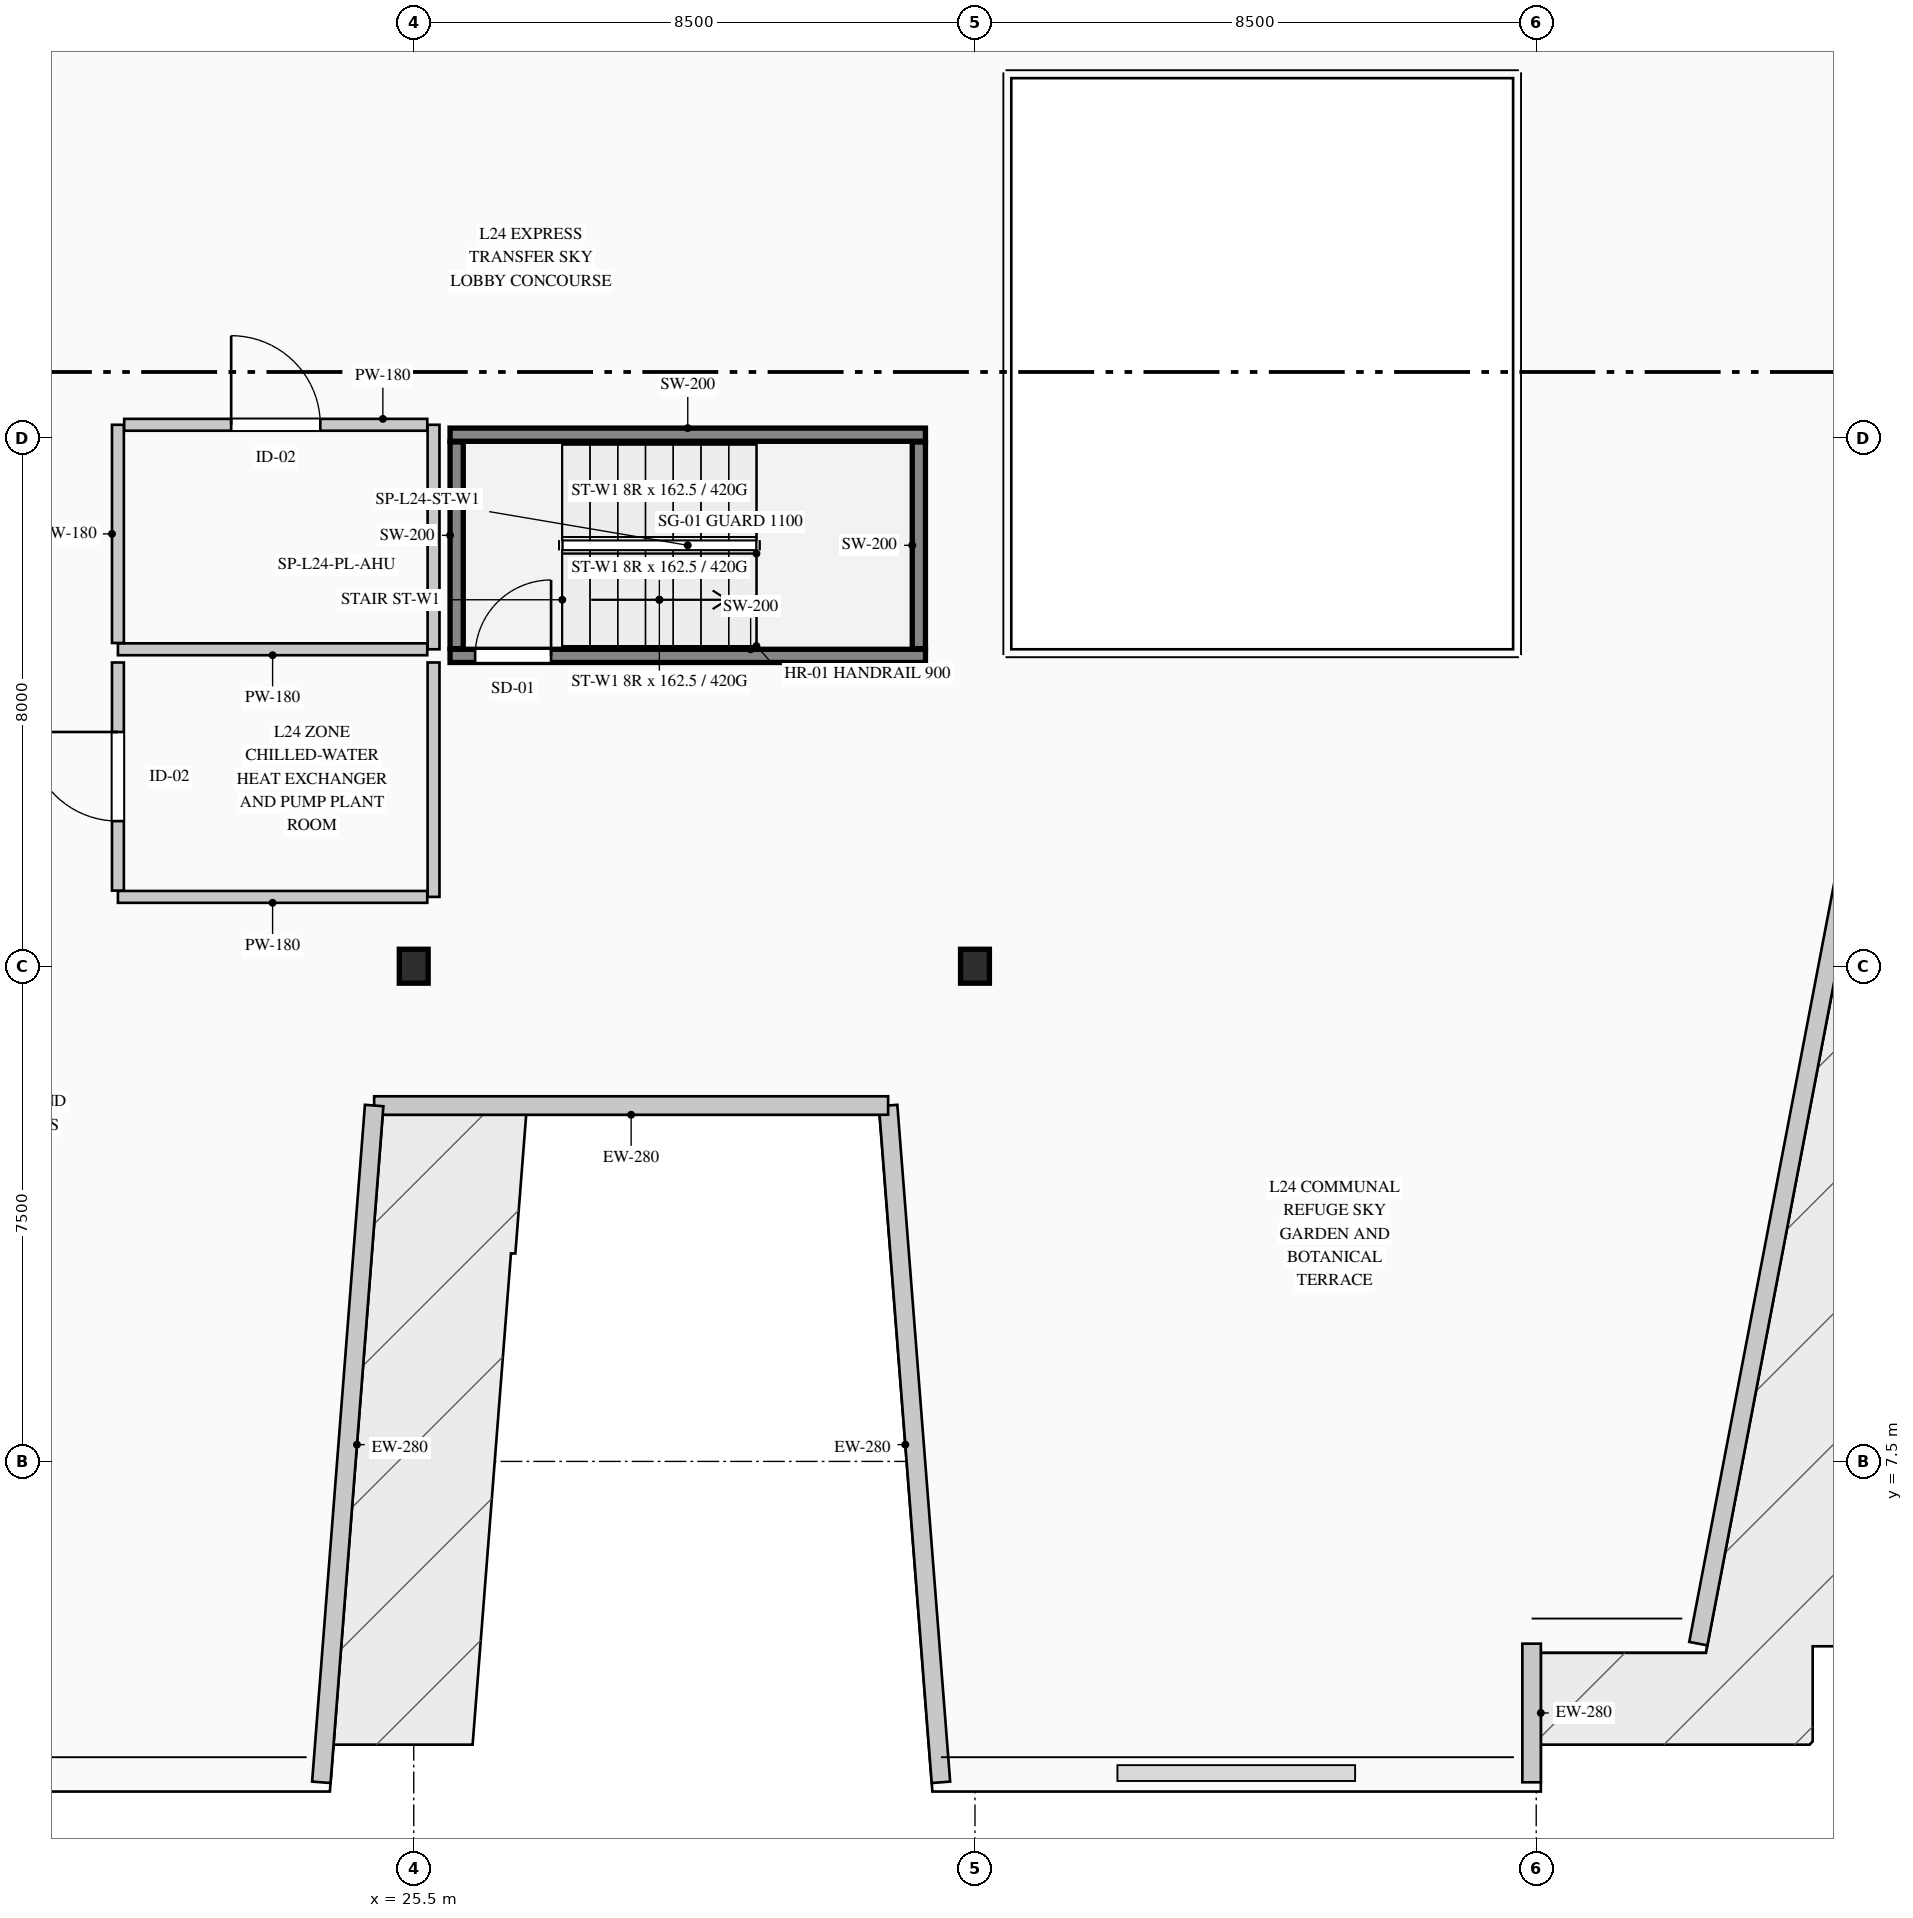
"""IFC4 building model, lengths in metres.
Left out: names, types, materials, properties, quantities, classifications, styles, units other than length and angle.
Written with IfcOpenShell. Run it as: python <this file> out.ifc"""

import sys

from ifc_helpers import new_model, si_unit, direction, frame, frame_2d, origin, origin_2d, place, context, subcontext, project, spatial, rectangle, i_section, extrude, element, fill, save


model = new_model("IFC4")
c1 = context("Model", 3, precision=1e-05, world=origin(), true_north=direction((0.0, 1.0)))
c2 = subcontext(c1, "Body", "Model", "MODEL_VIEW")
j1 = project(units=[si_unit("LENGTHUNIT", "METRE"), si_unit("PLANEANGLEUNIT", "RADIAN")], contexts=[c1])
p1 = place(None, origin())
s1 = spatial("IfcSite", under=j1, at=p1, CompositionType="ELEMENT")
p2 = place(p1, origin())
s2 = spatial("IfcBuilding", under=s1, at=p2, CompositionType="ELEMENT")
p3 = place(p2, frame((0.0, 0.0, 106.2)))
s3 = spatial("IfcBuildingStorey", under=s2, at=p3, CompositionType="ELEMENT", Elevation=106.2)
p4 = place(p3, frame((26.05, 19.7, 0.0), z_axis=(0.0, 0.0, 1.0), x_axis=(1.0, 0.0, 0.0)))
e1 = element("IfcWall", 1, at=p4, inside=s3, PredefinedType="SHEAR", context=c2, shape_type="SweptSolid", body=[
    extrude(rectangle(XDim=7.2, YDim=0.2, at=frame_2d((3.6, 0.0))), origin(), (0.0, 0.0, 1.0), 5.2),
])
p5 = place(p4, frame((0.38, 0.0, 0.0)))
e2 = element("IfcOpeningElement", 2, at=p5, cuts=e1, PredefinedType="OPENING", context=c2, shape_type="SweptSolid", body=[
    extrude(rectangle(XDim=1.15, YDim=2.2, at=frame_2d((0.575, 1.1))), frame((0.0, 0.11, 0.0), z_axis=(0.0, -1.0, 0.0), x_axis=(1.0, 0.0, 0.0)), (0.0, 0.0, 1.0), 0.22),
])
p6 = place(p3, frame((26.05, 23.05, 0.0), z_axis=(0.0, 0.0, 1.0), x_axis=(1.0, 0.0, 0.0)))
e3 = element("IfcWall", 3, at=p6, inside=s3, PredefinedType="SHEAR", context=c2, shape_type="SweptSolid", body=[
    extrude(rectangle(XDim=7.2, YDim=0.2, at=frame_2d((3.6, 0.0))), origin(), (0.0, 0.0, 1.0), 5.2),
])
for number, where, z_axis, x_axis in (
    (4, (26.15, 19.81, 0.0), (0.0, 0.0, 1.0), (0.0, 1.0, 0.0)),
    (5, (33.15, 19.81, 0.0), (0.0, 0.0, 1.0), (0.0, 1.0, 0.0)),
):
    element("IfcWall", number, at=place(p3, frame(where, z_axis=z_axis, x_axis=x_axis)), inside=s3, PredefinedType="SHEAR", context=c2, shape_type="SweptSolid", body=[
        extrude(rectangle(XDim=3.13, YDim=0.2, at=frame_2d((1.565, 0.0))), origin(), (0.0, 0.0, 1.0), 5.2),
    ])
for number, where, z_axis, x_axis in (
    (6, (25.5, 15.0, 0.0), (0.0, 0.0, 1.0), (1.0, 0.0, 0.0)),
    (7, (34.0, 15.0, 0.0), (0.0, 0.0, 1.0), (1.0, 0.0, 0.0)),
):
    element("IfcColumn", number, at=place(p3, frame(where, z_axis=z_axis, x_axis=x_axis)), inside=s3, PredefinedType="COLUMN", context=c2, shape_type="SweptSolid", body=[
        extrude(i_section(OverallWidth=0.437, OverallDepth=0.514, WebThickness=0.061, FlangeThickness=0.077, FilletRadius=0.015, at=origin_2d()), origin(), (0.0, 0.0, 1.0), 5.2),
    ])
p7 = place(p3, frame((51.93, 41.26, 0.0), z_axis=(0.0, 0.0, 1.0), x_axis=(-0.18759004207, -0.982247410847, 0.0)))
e8 = element("IfcWall", 8, at=p7, inside=s3, PredefinedType="STANDARD", context=c2, shape_type="SweptSolid", body=[
    extrude(rectangle(XDim=37.18, YDim=0.28, at=frame_2d((18.59, 0.0))), origin(), (0.0, 0.0, 1.0), 4.94),
])
p8 = place(p3, frame((42.43, 4.74, 0.0), z_axis=(0.0, 0.0, 1.0), x_axis=(0.0, -1.0, 0.0)))
e9 = element("IfcWall", 9, at=p8, inside=s3, PredefinedType="STANDARD", context=c2, shape_type="SweptSolid", body=[
    extrude(rectangle(XDim=2.1, YDim=0.28, at=frame_2d((1.05, 0.0))), origin(), (0.0, 0.0, 1.0), 4.94),
])
p9 = place(p3, frame((33.485, 2.64, 0.0), z_axis=(0.0, 0.0, 1.0), x_axis=(-0.077816860153, 0.996967670627, 0.0)))
e10 = element("IfcWall", 10, at=p9, inside=s3, PredefinedType="STANDARD", context=c2, shape_type="SweptSolid", body=[
    extrude(rectangle(XDim=10.281, YDim=0.28, at=frame_2d((5.141, 0.0))), origin(), (0.0, 0.0, 1.0), 4.94),
])
p10 = place(p3, frame((32.685, 12.89, 0.0), z_axis=(0.0, 0.0, 1.0), x_axis=(-1.0, 0.0, 0.0)))
e11 = element("IfcWall", 11, at=p10, inside=s3, PredefinedType="STANDARD", context=c2, shape_type="SweptSolid", body=[
    extrude(rectangle(XDim=7.784, YDim=0.28, at=frame_2d((3.892, 0.0))), origin(), (0.0, 0.0, 1.0), 4.94),
])
p11 = place(p3, frame((24.9, 12.89, 0.0), z_axis=(0.0, 0.0, 1.0), x_axis=(-0.077793257511, -0.996969512616, 0.0)))
e12 = element("IfcWall", 12, at=p11, inside=s3, PredefinedType="STANDARD", context=c2, shape_type="SweptSolid", body=[
    extrude(rectangle(XDim=10.281, YDim=0.28, at=frame_2d((5.141, 0.0))), origin(), (0.0, 0.0, 1.0), 4.94),
])
p12 = place(p3, frame((25.8, 23.2, 0.0), z_axis=(0.0, 0.0, 1.0), x_axis=(0.0, -1.0, 0.0)))
e13 = element("IfcWall", 13, at=p12, inside=s3, PredefinedType="PARTITIONING", context=c2, shape_type="SweptSolid", body=[
    extrude(rectangle(XDim=3.4, YDim=0.18, at=frame_2d((1.7, 0.0))), origin(), (0.0, 0.0, 1.0), 4.94),
])
p13 = place(p3, frame((25.705, 19.8, 0.0), z_axis=(0.0, 0.0, 1.0), x_axis=(-1.0, 0.0, 0.0)))
e14 = element("IfcWall", 14, at=p13, inside=s3, PredefinedType="PARTITIONING", context=c2, shape_type="SweptSolid", body=[
    extrude(rectangle(XDim=4.685, YDim=0.18, at=frame_2d((2.343, 0.0))), origin(), (0.0, 0.0, 1.0), 4.94),
])
p14 = place(p3, frame((21.02, 19.895, 0.0), z_axis=(0.0, 0.0, 1.0), x_axis=(0.0, 1.0, 0.0)))
e15 = element("IfcWall", 15, at=p14, inside=s3, PredefinedType="PARTITIONING", context=c2, shape_type="SweptSolid", body=[
    extrude(rectangle(XDim=3.305, YDim=0.18, at=frame_2d((1.652, 0.0))), origin(), (0.0, 0.0, 1.0), 4.94),
])
p15 = place(p3, frame((21.115, 23.2, 0.0), z_axis=(0.0, 0.0, 1.0), x_axis=(1.0, 0.0, 0.0)))
e16 = element("IfcWall", 16, at=p15, inside=s3, PredefinedType="PARTITIONING", context=c2, shape_type="SweptSolid", body=[
    extrude(rectangle(XDim=4.59, YDim=0.18, at=frame_2d((2.295, 0.0))), origin(), (0.0, 0.0, 1.0), 4.94),
])
p16 = place(p15, frame((1.62, 0.0, 0.0)))
e17 = element("IfcOpeningElement", 17, at=p16, cuts=e16, PredefinedType="OPENING", context=c2, shape_type="SweptSolid", body=[
    extrude(rectangle(XDim=1.35, YDim=2.2, at=frame_2d((0.675, 1.1))), frame((0.0, 0.1, 0.0), z_axis=(0.0, -1.0, 0.0), x_axis=(1.0, 0.0, 0.0)), (0.0, 0.0, 1.0), 0.2),
])
p17 = place(p3, frame((25.8, 19.6, 0.0), z_axis=(0.0, 0.0, 1.0), x_axis=(0.0, -1.0, 0.0)))
e18 = element("IfcWall", 18, at=p17, inside=s3, PredefinedType="PARTITIONING", context=c2, shape_type="SweptSolid", body=[
    extrude(rectangle(XDim=3.55, YDim=0.18, at=frame_2d((1.775, 0.0))), origin(), (0.0, 0.0, 1.0), 4.94),
])
p18 = place(p3, frame((25.705, 16.05, 0.0), z_axis=(0.0, 0.0, 1.0), x_axis=(-1.0, 0.0, 0.0)))
e19 = element("IfcWall", 19, at=p18, inside=s3, PredefinedType="PARTITIONING", context=c2, shape_type="SweptSolid", body=[
    extrude(rectangle(XDim=4.685, YDim=0.18, at=frame_2d((2.343, 0.0))), origin(), (0.0, 0.0, 1.0), 4.565),
])
p19 = place(p3, frame((21.02, 16.145, 0.0), z_axis=(0.0, 0.0, 1.0), x_axis=(0.0, 1.0, 0.0)))
e20 = element("IfcWall", 20, at=p19, inside=s3, PredefinedType="PARTITIONING", context=c2, shape_type="SweptSolid", body=[
    extrude(rectangle(XDim=3.455, YDim=0.18, at=frame_2d((1.728, 0.0))), origin(), (0.0, 0.0, 1.0), 4.94),
])
p20 = place(p19, frame((1.052, 0.0, 0.0)))
e21 = element("IfcOpeningElement", 21, at=p20, cuts=e20, PredefinedType="OPENING", context=c2, shape_type="SweptSolid", body=[
    extrude(rectangle(XDim=1.35, YDim=2.2, at=frame_2d((0.675, 1.1))), frame((0.0, 0.1, 0.0), z_axis=(0.0, -1.0, 0.0), x_axis=(1.0, 0.0, 0.0)), (0.0, 0.0, 1.0), 0.2),
])
p21 = place(p5, origin())
e22 = element("IfcDoor", 22, at=p21, inside=s3, OperationType="SINGLE_SWING_RIGHT", PredefinedType="DOOR", context=c2, shape_type="SweptSolid", body=[
    extrude(rectangle(XDim=1.15, YDim=2.2, at=frame_2d((0.575, 1.1))), frame((0.0, 0.025, 0.0), z_axis=(0.0, -1.0, 0.0), x_axis=(1.0, 0.0, 0.0)), (0.0, 0.0, 1.0), 0.05),
])
fill(e2, e22)
p22 = place(p16, origin())
e23 = element("IfcDoor", 23, at=p22, inside=s3, OperationType="SINGLE_SWING_LEFT", PredefinedType="DOOR", context=c2, shape_type="SweptSolid", body=[
    extrude(rectangle(XDim=1.35, YDim=2.2, at=frame_2d((0.675, 1.1))), frame((0.0, 0.025, 0.0), z_axis=(0.0, -1.0, 0.0), x_axis=(1.0, 0.0, 0.0)), (0.0, 0.0, 1.0), 0.05),
])
fill(e17, e23)
p23 = place(p20, origin())
e24 = element("IfcDoor", 24, at=p23, inside=s3, OperationType="SINGLE_SWING_RIGHT", PredefinedType="DOOR", context=c2, shape_type="SweptSolid", body=[
    extrude(rectangle(XDim=1.35, YDim=2.2, at=frame_2d((0.675, 1.1))), frame((0.0, 0.025, 0.0), z_axis=(0.0, -1.0, 0.0), x_axis=(1.0, 0.0, 0.0)), (0.0, 0.0, 1.0), 0.05),
])
fill(e21, e24)
save(model, sys.argv[1])
